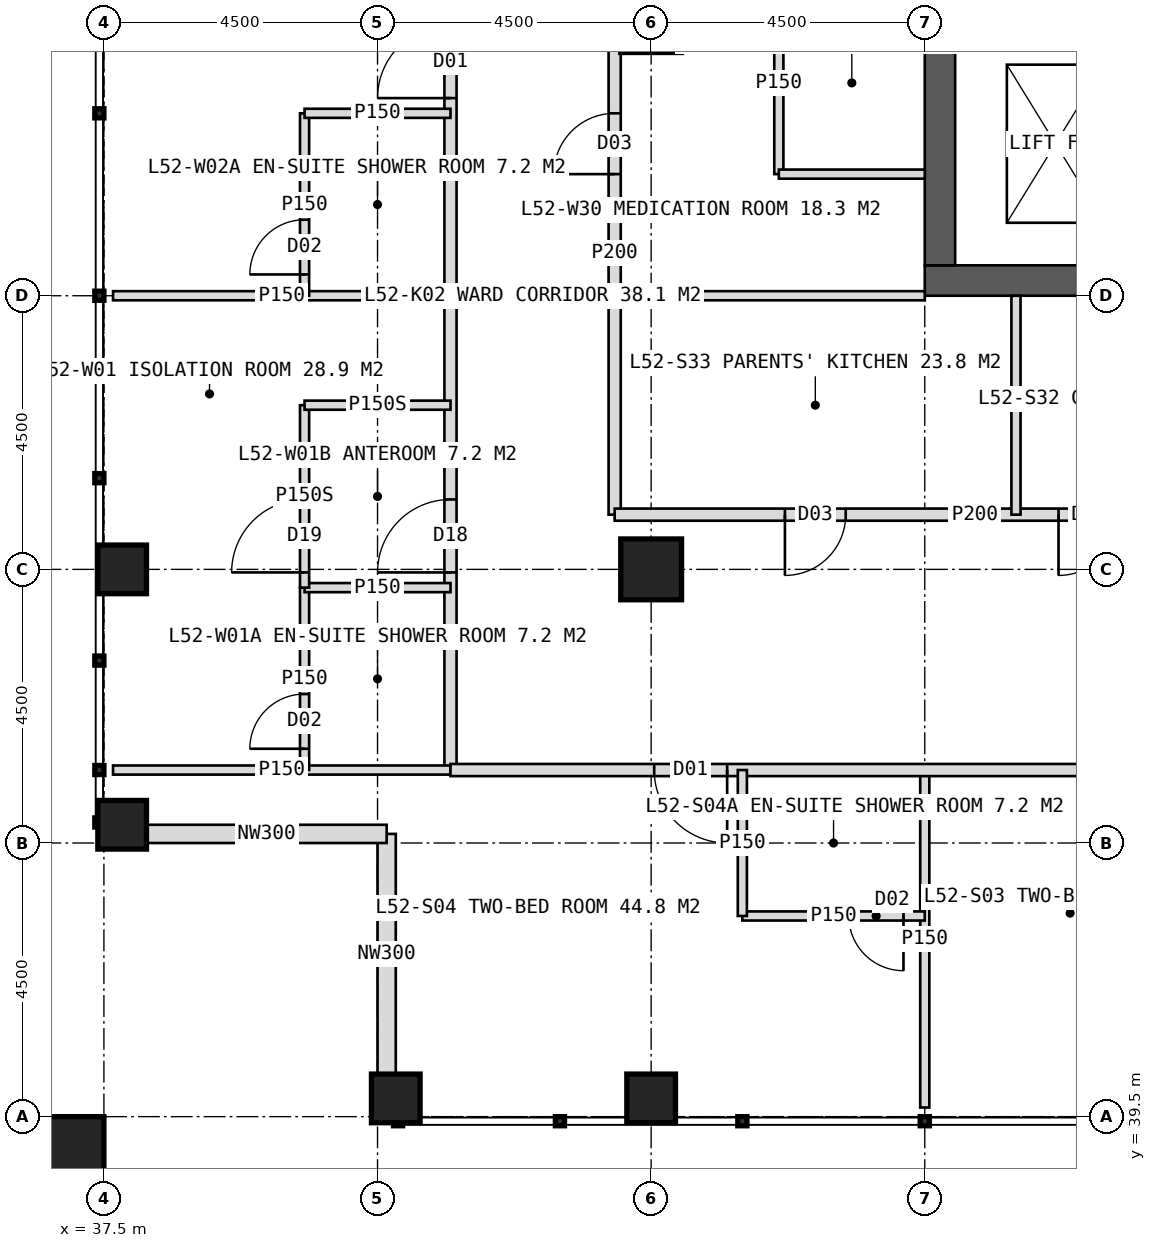
"""IFC4 building model, lengths in metres.
Left out: names, types, materials, properties, quantities, classifications, styles, units other than length and angle.
Written with IfcOpenShell. Run it as: python <this file> out.ifc"""

import sys

from ifc_helpers import new_model, si_unit, direction, frame, frame_2d, origin, origin_2d, place, context, subcontext, project, spatial, rectangle, hollow_rectangle, extrude, element, fill, save


model = new_model("IFC4")
c1 = context("Model", 3, precision=1e-05, world=origin(), true_north=direction((0.0, 1.0)))
c2 = subcontext(c1, "Body", "Model", "MODEL_VIEW")
j1 = project(units=[si_unit("LENGTHUNIT", "METRE"), si_unit("PLANEANGLEUNIT", "RADIAN")], contexts=[c1])
p1 = place(None, origin())
s1 = spatial("IfcSite", under=j1, at=p1, CompositionType="ELEMENT")
p2 = place(p1, origin())
s2 = spatial("IfcBuilding", under=s1, at=p2, CompositionType="ELEMENT")
p3 = place(p2, frame((0.0, 0.0, 217.0)))
s3 = spatial("IfcBuildingStorey", under=s2, at=p3, CompositionType="ELEMENT", Elevation=217.0)
p4 = place(p3, frame((51.0, 53.25, 0.0), z_axis=(0.0, 0.0, 1.0), x_axis=(1.0, 0.0, 0.0)))
e1 = element("IfcWall", 1, at=p4, inside=s3, PredefinedType="SHEAR", context=c2, shape_type="SweptSolid", body=[
    extrude(rectangle(XDim=18.0, YDim=0.5, at=frame_2d((9.0, 0.0))), origin(), (0.0, 0.0, 1.0), 4.0),
])
p5 = place(p4, frame((8.1, 0.0, 0.0)))
e2 = element("IfcOpeningElement", 2, at=p5, cuts=e1, PredefinedType="OPENING", context=c2, shape_type="SweptSolid", body=[
    extrude(rectangle(XDim=1.8, YDim=2.2, at=frame_2d((0.9, 1.1))), frame((0.0, 0.26, 0.0), z_axis=(0.0, -1.0, 0.0), x_axis=(1.0, 0.0, 0.0)), (0.0, 0.0, 1.0), 0.52),
])
p6 = place(p3, frame((51.25, 53.5, 0.0), z_axis=(0.0, 0.0, 1.0), x_axis=(0.0, 1.0, 0.0)))
e3 = element("IfcWall", 3, at=p6, inside=s3, PredefinedType="SHEAR", context=c2, shape_type="SweptSolid", body=[
    extrude(rectangle(XDim=17.0, YDim=0.5, at=frame_2d((8.5, 0.0))), origin(), (0.0, 0.0, 1.0), 4.0),
])
p7 = place(p6, frame((6.1, 0.0, 0.0)))
e4 = element("IfcOpeningElement", 4, at=p7, cuts=e3, PredefinedType="OPENING", context=c2, shape_type="SweptSolid", body=[
    extrude(rectangle(XDim=1.5, YDim=2.2, at=frame_2d((0.75, 1.1))), frame((0.0, 0.26, 0.0), z_axis=(0.0, -1.0, 0.0), x_axis=(1.0, 0.0, 0.0)), (0.0, 0.0, 1.0), 0.52),
])
p8 = place(p3, frame((46.5, 48.5, 0.0), z_axis=(0.0, 0.0, 1.0), x_axis=(1.0, 0.0, 0.0)))
e5 = element("IfcColumn", 5, at=p8, inside=s3, PredefinedType="COLUMN", context=c2, shape_type="SweptSolid", body=[
    extrude(hollow_rectangle(XDim=1.0, YDim=1.0, WallThickness=0.1, at=origin_2d()), origin(), (0.0, 0.0, 1.0), 4.0),
])
for number, where, z_axis, x_axis in (
    (6, (42.3, 39.8, 0.0), (0.0, 0.0, 1.0), (1.0, 0.0, 0.0)),
    (7, (37.8, 44.3, 0.0), (0.0, 0.0, 1.0), (1.0, 0.0, 0.0)),
    (8, (46.5, 39.8, 0.0), (0.0, 0.0, 1.0), (1.0, 0.0, 0.0)),
    (9, (37.8, 48.5, 0.0), (0.0, 0.0, 1.0), (1.0, 0.0, 0.0)),
):
    element("IfcColumn", number, at=place(p3, frame(where, z_axis=z_axis, x_axis=x_axis)), inside=s3, PredefinedType="COLUMN", context=c2, shape_type="SweptSolid", body=[
        extrude(hollow_rectangle(XDim=0.8, YDim=0.8, WallThickness=0.08, at=origin_2d()), origin(), (0.0, 0.0, 1.0), 4.0),
    ])
p9 = place(p3, frame((36.9, 38.9, 0.0), z_axis=(0.0, 0.0, 1.0), x_axis=(1.0, 0.0, 0.0)))
e10 = element("IfcColumn", 10, at=p9, inside=s3, PredefinedType="COLUMN", context=c2, shape_type="SweptSolid", body=[
    extrude(hollow_rectangle(XDim=1.2, YDim=1.2, WallThickness=0.07, at=origin_2d()), origin(), (0.0, 0.0, 1.0), 4.0),
])
for number, where, z_axis, x_axis in (
    (11, (42.15, 40.2, 0.0), (0.0, 0.0, 1.0), (0.0, 1.0, 0.0)),
    (12, (42.15, 44.15, 0.0), (0.0, 0.0, 1.0), (-1.0, 0.0, 0.0)),
):
    element("IfcWall", number, at=place(p3, frame(where, z_axis=z_axis, x_axis=x_axis)), inside=s3, PredefinedType="ELEMENTEDWALL", context=c2, shape_type="SweptSolid", body=[
        extrude(rectangle(XDim=3.95, YDim=0.3, at=frame_2d((1.975, 0.0))), origin(), (0.0, 0.0, 1.0), 2.85),
    ])
p10 = place(p3, frame((43.2, 53.0, 0.0), z_axis=(0.0, 0.0, 1.0), x_axis=(-1.0, 0.0, 0.0)))
e13 = element("IfcWall", 13, at=p10, inside=s3, PredefinedType="PARTITIONING", context=c2, shape_type="SweptSolid", body=[
    extrude(rectangle(XDim=5.55, YDim=0.15, at=frame_2d((2.775, 0.0))), origin(), (0.0, 0.0, 1.0), 3.75),
])
p11 = place(p3, frame((43.2, 45.2, 0.0), z_axis=(0.0, 0.0, 1.0), x_axis=(0.0, 1.0, 0.0)))
e14 = element("IfcWall", 14, at=p11, inside=s3, PredefinedType="PARTITIONING", context=c2, shape_type="SweptSolid", body=[
    extrude(rectangle(XDim=33.6, YDim=0.2, at=frame_2d((16.8, 0.0))), origin(), (0.0, 0.0, 1.0), 3.75),
])
p12 = place(p11, frame((3.25, 0.0, 0.0)))
e15 = element("IfcOpeningElement", 15, at=p12, cuts=e14, PredefinedType="OPENING", context=c2, shape_type="SweptSolid", body=[
    extrude(rectangle(XDim=1.2, YDim=2.2, at=frame_2d((0.6, 1.1))), frame((0.0, 0.11, 0.0), z_axis=(0.0, -1.0, 0.0), x_axis=(1.0, 0.0, 0.0)), (0.0, 0.0, 1.0), 0.22),
])
p13 = place(p11, frame((11.05, 0.0, 0.0)))
e16 = element("IfcOpeningElement", 16, at=p13, cuts=e14, PredefinedType="OPENING", context=c2, shape_type="SweptSolid", body=[
    extrude(rectangle(XDim=1.2, YDim=2.2, at=frame_2d((0.6, 1.1))), frame((0.0, 0.11, 0.0), z_axis=(0.0, -1.0, 0.0), x_axis=(1.0, 0.0, 0.0)), (0.0, 0.0, 1.0), 0.22),
])
p14 = place(p11, frame((20.05, 0.0, 0.0)))
e17 = element("IfcOpeningElement", 17, at=p14, cuts=e14, PredefinedType="OPENING", context=c2, shape_type="SweptSolid", body=[
    extrude(rectangle(XDim=1.2, YDim=2.2, at=frame_2d((0.6, 1.1))), frame((0.0, 0.11, 0.0), z_axis=(0.0, -1.0, 0.0), x_axis=(1.0, 0.0, 0.0)), (0.0, 0.0, 1.0), 0.22),
])
p15 = place(p11, frame((26.95, 0.0, 0.0)))
e18 = element("IfcOpeningElement", 18, at=p15, cuts=e14, PredefinedType="OPENING", context=c2, shape_type="SweptSolid", body=[
    extrude(rectangle(XDim=1.2, YDim=2.2, at=frame_2d((0.6, 1.1))), frame((0.0, 0.11, 0.0), z_axis=(0.0, -1.0, 0.0), x_axis=(1.0, 0.0, 0.0)), (0.0, 0.0, 1.0), 0.22),
])
p16 = place(p3, frame((43.2, 45.2, 0.0), z_axis=(0.0, 0.0, 1.0), x_axis=(-1.0, 0.0, 0.0)))
e19 = element("IfcWall", 19, at=p16, inside=s3, PredefinedType="PARTITIONING", context=c2, shape_type="SweptSolid", body=[
    extrude(rectangle(XDim=5.55, YDim=0.15, at=frame_2d((2.775, 0.0))), origin(), (0.0, 0.0, 1.0), 3.75),
])
p17 = place(p3, frame((40.8, 45.2, 0.0), z_axis=(0.0, 0.0, 1.0), x_axis=(0.0, 1.0, 0.0)))
e20 = element("IfcWall", 20, at=p17, inside=s3, PredefinedType="PARTITIONING", context=c2, shape_type="SweptSolid", body=[
    extrude(rectangle(XDim=3.0, YDim=0.15, at=frame_2d((1.5, 0.0))), origin(), (0.0, 0.0, 1.0), 3.75),
])
p18 = place(p17, frame((0.35, 0.0, 0.0)))
e21 = element("IfcOpeningElement", 21, at=p18, cuts=e20, PredefinedType="OPENING", context=c2, shape_type="SweptSolid", body=[
    extrude(rectangle(XDim=0.9, YDim=2.1, at=frame_2d((0.45, 1.05))), frame((0.0, 0.085, 0.0), z_axis=(0.0, -1.0, 0.0), x_axis=(1.0, 0.0, 0.0)), (0.0, 0.0, 1.0), 0.17),
])
p19 = place(p3, frame((43.2, 48.2, 0.0), z_axis=(0.0, 0.0, 1.0), x_axis=(-1.0, 0.0, 0.0)))
e22 = element("IfcWall", 22, at=p19, inside=s3, PredefinedType="PARTITIONING", context=c2, shape_type="SweptSolid", body=[
    extrude(rectangle(XDim=2.4, YDim=0.15, at=frame_2d((1.2, 0.0))), origin(), (0.0, 0.0, 1.0), 3.75),
])
p20 = place(p3, frame((40.8, 48.2, 0.0), z_axis=(0.0, 0.0, 1.0), x_axis=(0.0, 1.0, 0.0)))
e23 = element("IfcWall", 23, at=p20, inside=s3, PredefinedType="PARTITIONING", context=c2, shape_type="SweptSolid", body=[
    extrude(rectangle(XDim=3.0, YDim=0.15, at=frame_2d((1.5, 0.0))), origin(), (0.0, 0.0, 1.0), 3.75),
])
p21 = place(p20, frame((0.25, 0.0, 0.0)))
e24 = element("IfcOpeningElement", 24, at=p21, cuts=e23, PredefinedType="OPENING", context=c2, shape_type="SweptSolid", body=[
    extrude(rectangle(XDim=1.2, YDim=2.2, at=frame_2d((0.6, 1.1))), frame((0.0, 0.085, 0.0), z_axis=(0.0, -1.0, 0.0), x_axis=(1.0, 0.0, 0.0)), (0.0, 0.0, 1.0), 0.17),
])
p22 = place(p3, frame((43.2, 51.2, 0.0), z_axis=(0.0, 0.0, 1.0), x_axis=(-1.0, 0.0, 0.0)))
e25 = element("IfcWall", 25, at=p22, inside=s3, PredefinedType="PARTITIONING", context=c2, shape_type="SweptSolid", body=[
    extrude(rectangle(XDim=2.4, YDim=0.15, at=frame_2d((1.2, 0.0))), origin(), (0.0, 0.0, 1.0), 3.75),
])
p23 = place(p3, frame((40.8, 53.0, 0.0), z_axis=(0.0, 0.0, 1.0), x_axis=(0.0, 1.0, 0.0)))
e26 = element("IfcWall", 26, at=p23, inside=s3, PredefinedType="PARTITIONING", context=c2, shape_type="SweptSolid", body=[
    extrude(rectangle(XDim=3.0, YDim=0.15, at=frame_2d((1.5, 0.0))), origin(), (0.0, 0.0, 1.0), 3.75),
])
p24 = place(p23, frame((0.35, 0.0, 0.0)))
e27 = element("IfcOpeningElement", 27, at=p24, cuts=e26, PredefinedType="OPENING", context=c2, shape_type="SweptSolid", body=[
    extrude(rectangle(XDim=0.9, YDim=2.1, at=frame_2d((0.45, 1.05))), frame((0.0, 0.085, 0.0), z_axis=(0.0, -1.0, 0.0), x_axis=(1.0, 0.0, 0.0)), (0.0, 0.0, 1.0), 0.17),
])
p25 = place(p3, frame((43.2, 56.0, 0.0), z_axis=(0.0, 0.0, 1.0), x_axis=(-1.0, 0.0, 0.0)))
e28 = element("IfcWall", 28, at=p25, inside=s3, PredefinedType="PARTITIONING", context=c2, shape_type="SweptSolid", body=[
    extrude(rectangle(XDim=2.4, YDim=0.15, at=frame_2d((1.2, 0.0))), origin(), (0.0, 0.0, 1.0), 3.75),
])
p26 = place(p3, frame((51.0, 53.0, 0.0), z_axis=(0.0, 0.0, 1.0), x_axis=(-1.0, 0.0, 0.0)))
e29 = element("IfcWall", 29, at=p26, inside=s3, PredefinedType="PARTITIONING", context=c2, shape_type="SweptSolid", body=[
    extrude(rectangle(XDim=5.1, YDim=0.15, at=frame_2d((2.55, 0.0))), origin(), (0.0, 0.0, 1.0), 3.75),
])
p27 = place(p3, frame((45.9, 49.4, 0.0), z_axis=(0.0, 0.0, 1.0), x_axis=(0.0, 1.0, 0.0)))
e30 = element("IfcWall", 30, at=p27, inside=s3, PredefinedType="PARTITIONING", context=c2, shape_type="SweptSolid", body=[
    extrude(rectangle(XDim=8.6, YDim=0.2, at=frame_2d((4.3, 0.0))), origin(), (0.0, 0.0, 1.0), 3.75),
])
p28 = place(p27, frame((5.6, 0.0, 0.0)))
e31 = element("IfcOpeningElement", 31, at=p28, cuts=e30, PredefinedType="OPENING", context=c2, shape_type="SweptSolid", body=[
    extrude(rectangle(XDim=1.0, YDim=2.1, at=frame_2d((0.5, 1.05))), frame((0.0, 0.11, 0.0), z_axis=(0.0, -1.0, 0.0), x_axis=(1.0, 0.0, 0.0)), (0.0, 0.0, 1.0), 0.22),
])
p29 = place(p3, frame((48.6, 55.0, 0.0), z_axis=(0.0, 0.0, 1.0), x_axis=(0.0, 1.0, 0.0)))
e32 = element("IfcWall", 32, at=p29, inside=s3, PredefinedType="PARTITIONING", context=c2, shape_type="SweptSolid", body=[
    extrude(rectangle(XDim=3.0, YDim=0.15, at=frame_2d((1.5, 0.0))), origin(), (0.0, 0.0, 1.0), 3.75),
])
p30 = place(p3, frame((51.0, 55.0, 0.0), z_axis=(0.0, 0.0, 1.0), x_axis=(-1.0, 0.0, 0.0)))
e33 = element("IfcWall", 33, at=p30, inside=s3, PredefinedType="PARTITIONING", context=c2, shape_type="SweptSolid", body=[
    extrude(rectangle(XDim=2.4, YDim=0.15, at=frame_2d((1.2, 0.0))), origin(), (0.0, 0.0, 1.0), 3.75),
])
p31 = place(p3, frame((51.0, 45.2, 0.0), z_axis=(0.0, 0.0, 1.0), x_axis=(0.0, -1.0, 0.0)))
e34 = element("IfcWall", 34, at=p31, inside=s3, PredefinedType="PARTITIONING", context=c2, shape_type="SweptSolid", body=[
    extrude(rectangle(XDim=5.55, YDim=0.15, at=frame_2d((2.775, 0.0))), origin(), (0.0, 0.0, 1.0), 3.75),
])
p32 = place(p3, frame((76.8, 45.2, 0.0), z_axis=(0.0, 0.0, 1.0), x_axis=(-1.0, 0.0, 0.0)))
e35 = element("IfcWall", 35, at=p32, inside=s3, PredefinedType="PARTITIONING", context=c2, shape_type="SweptSolid", body=[
    extrude(rectangle(XDim=33.6, YDim=0.2, at=frame_2d((16.8, 0.0))), origin(), (0.0, 0.0, 1.0), 3.75),
])
p33 = place(p32, frame((3.25, 0.0, 0.0)))
e36 = element("IfcOpeningElement", 36, at=p33, cuts=e35, PredefinedType="OPENING", context=c2, shape_type="SweptSolid", body=[
    extrude(rectangle(XDim=1.2, YDim=2.2, at=frame_2d((0.6, 1.1))), frame((0.0, 0.11, 0.0), z_axis=(0.0, -1.0, 0.0), x_axis=(1.0, 0.0, 0.0)), (0.0, 0.0, 1.0), 0.22),
])
p34 = place(p32, frame((11.05, 0.0, 0.0)))
e37 = element("IfcOpeningElement", 37, at=p34, cuts=e35, PredefinedType="OPENING", context=c2, shape_type="SweptSolid", body=[
    extrude(rectangle(XDim=1.2, YDim=2.2, at=frame_2d((0.6, 1.1))), frame((0.0, 0.11, 0.0), z_axis=(0.0, -1.0, 0.0), x_axis=(1.0, 0.0, 0.0)), (0.0, 0.0, 1.0), 0.22),
])
p35 = place(p32, frame((20.05, 0.0, 0.0)))
e38 = element("IfcOpeningElement", 38, at=p35, cuts=e35, PredefinedType="OPENING", context=c2, shape_type="SweptSolid", body=[
    extrude(rectangle(XDim=1.2, YDim=2.2, at=frame_2d((0.6, 1.1))), frame((0.0, 0.11, 0.0), z_axis=(0.0, -1.0, 0.0), x_axis=(1.0, 0.0, 0.0)), (0.0, 0.0, 1.0), 0.22),
])
p36 = place(p32, frame((29.05, 0.0, 0.0)))
e39 = element("IfcOpeningElement", 39, at=p36, cuts=e35, PredefinedType="OPENING", context=c2, shape_type="SweptSolid", body=[
    extrude(rectangle(XDim=1.2, YDim=2.2, at=frame_2d((0.6, 1.1))), frame((0.0, 0.11, 0.0), z_axis=(0.0, -1.0, 0.0), x_axis=(1.0, 0.0, 0.0)), (0.0, 0.0, 1.0), 0.22),
])
p37 = place(p3, frame((51.0, 42.8, 0.0), z_axis=(0.0, 0.0, 1.0), x_axis=(-1.0, 0.0, 0.0)))
e40 = element("IfcWall", 40, at=p37, inside=s3, PredefinedType="PARTITIONING", context=c2, shape_type="SweptSolid", body=[
    extrude(rectangle(XDim=3.0, YDim=0.15, at=frame_2d((1.5, 0.0))), origin(), (0.0, 0.0, 1.0), 3.75),
])
p38 = place(p37, frame((0.35, 0.0, 0.0)))
e41 = element("IfcOpeningElement", 41, at=p38, cuts=e40, PredefinedType="OPENING", context=c2, shape_type="SweptSolid", body=[
    extrude(rectangle(XDim=0.9, YDim=2.1, at=frame_2d((0.45, 1.05))), frame((0.0, 0.085, 0.0), z_axis=(0.0, -1.0, 0.0), x_axis=(1.0, 0.0, 0.0)), (0.0, 0.0, 1.0), 0.17),
])
p39 = place(p3, frame((48.0, 45.2, 0.0), z_axis=(0.0, 0.0, 1.0), x_axis=(0.0, -1.0, 0.0)))
e42 = element("IfcWall", 42, at=p39, inside=s3, PredefinedType="PARTITIONING", context=c2, shape_type="SweptSolid", body=[
    extrude(rectangle(XDim=2.4, YDim=0.15, at=frame_2d((1.2, 0.0))), origin(), (0.0, 0.0, 1.0), 3.75),
])
p40 = place(p3, frame((57.75, 49.4, 0.0), z_axis=(0.0, 0.0, 1.0), x_axis=(-1.0, 0.0, 0.0)))
e43 = element("IfcWall", 43, at=p40, inside=s3, PredefinedType="PARTITIONING", context=c2, shape_type="SweptSolid", body=[
    extrude(rectangle(XDim=11.85, YDim=0.2, at=frame_2d((5.925, 0.0))), origin(), (0.0, 0.0, 1.0), 3.75),
])
p41 = place(p40, frame((3.55, 0.0, 0.0)))
e44 = element("IfcOpeningElement", 44, at=p41, cuts=e43, PredefinedType="OPENING", context=c2, shape_type="SweptSolid", body=[
    extrude(rectangle(XDim=1.0, YDim=2.1, at=frame_2d((0.5, 1.05))), frame((0.0, 0.11, 0.0), z_axis=(0.0, -1.0, 0.0), x_axis=(1.0, 0.0, 0.0)), (0.0, 0.0, 1.0), 0.22),
])
p42 = place(p40, frame((8.05, 0.0, 0.0)))
e45 = element("IfcOpeningElement", 45, at=p42, cuts=e43, PredefinedType="OPENING", context=c2, shape_type="SweptSolid", body=[
    extrude(rectangle(XDim=1.0, YDim=2.1, at=frame_2d((0.5, 1.05))), frame((0.0, 0.11, 0.0), z_axis=(0.0, -1.0, 0.0), x_axis=(1.0, 0.0, 0.0)), (0.0, 0.0, 1.0), 0.22),
])
p43 = place(p3, frame((52.5, 53.0, 0.0), z_axis=(0.0, 0.0, 1.0), x_axis=(0.0, -1.0, 0.0)))
e46 = element("IfcWall", 46, at=p43, inside=s3, PredefinedType="PARTITIONING", context=c2, shape_type="SweptSolid", body=[
    extrude(rectangle(XDim=3.6, YDim=0.15, at=frame_2d((1.8, 0.0))), origin(), (0.0, 0.0, 1.0), 3.75),
])
p44 = place(p21, origin())
e47 = element("IfcDoor", 47, at=p44, inside=s3, OperationType="SINGLE_SWING_LEFT", PredefinedType="DOOR", context=c2, shape_type="SweptSolid", body=[
    extrude(rectangle(XDim=1.2, YDim=2.2, at=frame_2d((0.6, 1.1))), frame((0.0, 0.025, 0.0), z_axis=(0.0, -1.0, 0.0), x_axis=(1.0, 0.0, 0.0)), (0.0, 0.0, 1.0), 0.05),
])
fill(e24, e47)
p45 = place(p12, origin())
e48 = element("IfcDoor", 48, at=p45, inside=s3, OperationType="SINGLE_SWING_LEFT", PredefinedType="DOOR", context=c2, shape_type="SweptSolid", body=[
    extrude(rectangle(XDim=1.2, YDim=2.2, at=frame_2d((0.6, 1.1))), frame((0.0, 0.025, 0.0), z_axis=(0.0, -1.0, 0.0), x_axis=(1.0, 0.0, 0.0)), (0.0, 0.0, 1.0), 0.05),
])
fill(e15, e48)
p46 = place(p18, origin())
e49 = element("IfcDoor", 49, at=p46, inside=s3, OperationType="SINGLE_SWING_LEFT", PredefinedType="DOOR", context=c2, shape_type="SweptSolid", body=[
    extrude(rectangle(XDim=0.9, YDim=2.1, at=frame_2d((0.45, 1.05))), frame((0.0, 0.025, 0.0), z_axis=(0.0, -1.0, 0.0), x_axis=(1.0, 0.0, 0.0)), (0.0, 0.0, 1.0), 0.05),
])
fill(e21, e49)
p47 = place(p13, origin())
e50 = element("IfcDoor", 50, at=p47, inside=s3, OperationType="SINGLE_SWING_LEFT", PredefinedType="DOOR", context=c2, shape_type="SweptSolid", body=[
    extrude(rectangle(XDim=1.2, YDim=2.2, at=frame_2d((0.6, 1.1))), frame((0.0, 0.025, 0.0), z_axis=(0.0, -1.0, 0.0), x_axis=(1.0, 0.0, 0.0)), (0.0, 0.0, 1.0), 0.05),
])
fill(e16, e50)
p48 = place(p24, origin())
e51 = element("IfcDoor", 51, at=p48, inside=s3, OperationType="SINGLE_SWING_LEFT", PredefinedType="DOOR", context=c2, shape_type="SweptSolid", body=[
    extrude(rectangle(XDim=0.9, YDim=2.1, at=frame_2d((0.45, 1.05))), frame((0.0, 0.025, 0.0), z_axis=(0.0, -1.0, 0.0), x_axis=(1.0, 0.0, 0.0)), (0.0, 0.0, 1.0), 0.05),
])
fill(e27, e51)
p49 = place(p28, origin())
e52 = element("IfcDoor", 52, at=p49, inside=s3, OperationType="SINGLE_SWING_LEFT", PredefinedType="DOOR", context=c2, shape_type="SweptSolid", body=[
    extrude(rectangle(XDim=1.0, YDim=2.1, at=frame_2d((0.5, 1.05))), frame((0.0, 0.025, 0.0), z_axis=(0.0, -1.0, 0.0), x_axis=(1.0, 0.0, 0.0)), (0.0, 0.0, 1.0), 0.05),
])
fill(e31, e52)
p50 = place(p36, origin())
e53 = element("IfcDoor", 53, at=p50, inside=s3, OperationType="SINGLE_SWING_LEFT", PredefinedType="DOOR", context=c2, shape_type="SweptSolid", body=[
    extrude(rectangle(XDim=1.2, YDim=2.2, at=frame_2d((0.6, 1.1))), frame((0.0, 0.025, 0.0), z_axis=(0.0, -1.0, 0.0), x_axis=(1.0, 0.0, 0.0)), (0.0, 0.0, 1.0), 0.05),
])
fill(e39, e53)
p51 = place(p38, origin())
e54 = element("IfcDoor", 54, at=p51, inside=s3, OperationType="SINGLE_SWING_LEFT", PredefinedType="DOOR", context=c2, shape_type="SweptSolid", body=[
    extrude(rectangle(XDim=0.9, YDim=2.1, at=frame_2d((0.45, 1.05))), frame((0.0, 0.025, 0.0), z_axis=(0.0, -1.0, 0.0), x_axis=(1.0, 0.0, 0.0)), (0.0, 0.0, 1.0), 0.05),
])
fill(e41, e54)
p52 = place(p41, origin())
e55 = element("IfcDoor", 55, at=p52, inside=s3, OperationType="SINGLE_SWING_RIGHT", PredefinedType="DOOR", context=c2, shape_type="SweptSolid", body=[
    extrude(rectangle(XDim=1.0, YDim=2.1, at=frame_2d((0.5, 1.05))), frame((0.0, 0.025, 0.0), z_axis=(0.0, -1.0, 0.0), x_axis=(1.0, 0.0, 0.0)), (0.0, 0.0, 1.0), 0.05),
])
fill(e44, e55)
p53 = place(p42, origin())
e56 = element("IfcDoor", 56, at=p53, inside=s3, OperationType="SINGLE_SWING_RIGHT", PredefinedType="DOOR", context=c2, shape_type="SweptSolid", body=[
    extrude(rectangle(XDim=1.0, YDim=2.1, at=frame_2d((0.5, 1.05))), frame((0.0, 0.025, 0.0), z_axis=(0.0, -1.0, 0.0), x_axis=(1.0, 0.0, 0.0)), (0.0, 0.0, 1.0), 0.05),
])
fill(e45, e56)
save(model, sys.argv[1])
